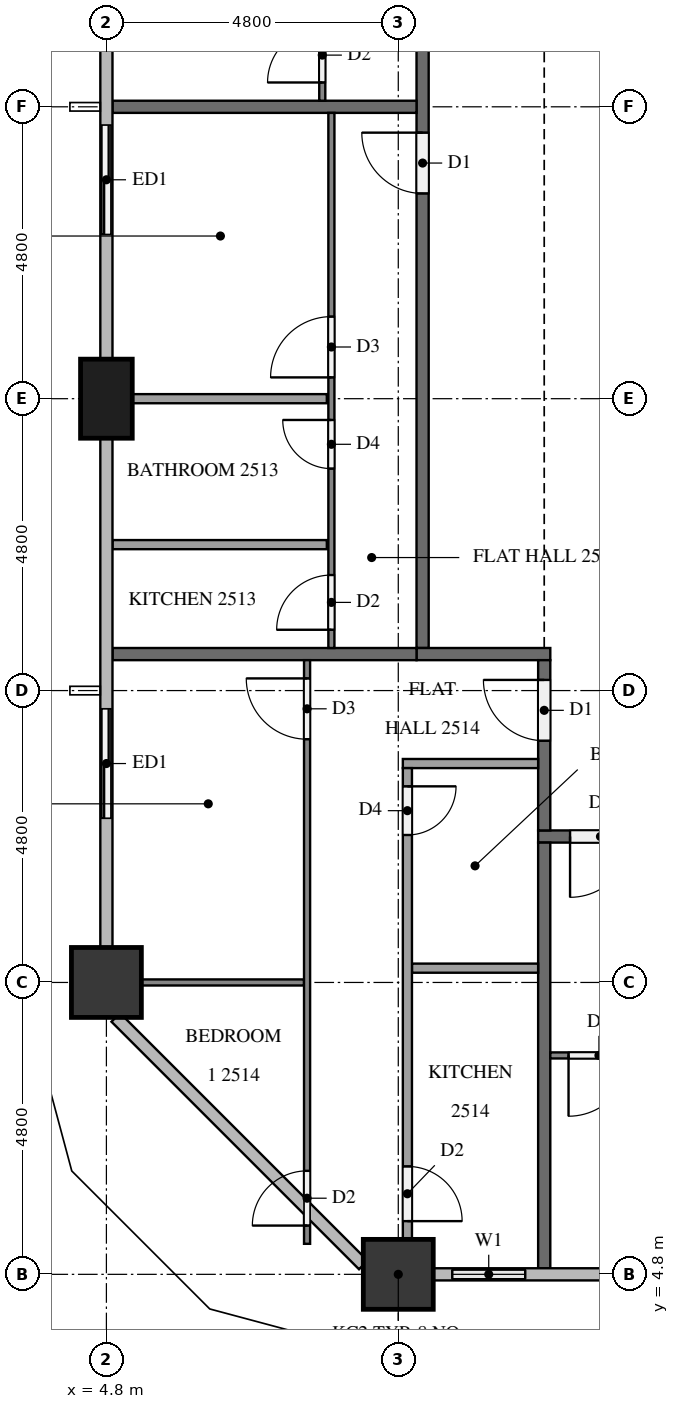
"""IFC4 building model, lengths in metres.
Left out: names, types, materials, properties, quantities, classifications, styles, units other than length and angle.
Written with IfcOpenShell. Run it as: python <this file> out.ifc"""

import sys

from ifc_helpers import new_model, si_unit, direction, frame, frame_2d, origin, origin_2d, place, context, subcontext, project, spatial, rectangle, extrude, element, fill, save


model = new_model("IFC4")
c1 = context("Model", 3, precision=1e-05, world=origin(), true_north=direction((0.0, 1.0)))
c2 = subcontext(c1, "Body", "Model", "MODEL_VIEW")
j1 = project(units=[si_unit("LENGTHUNIT", "METRE"), si_unit("PLANEANGLEUNIT", "RADIAN")], contexts=[c1])
p1 = place(None, origin())
s1 = spatial("IfcSite", under=j1, at=p1, CompositionType="ELEMENT")
p2 = place(p1, origin())
s2 = spatial("IfcBuilding", under=s1, at=p2, CompositionType="ELEMENT")
p3 = place(p2, frame((0.0, 0.0, 99.7)))
s3 = spatial("IfcBuildingStorey", under=s2, at=p3, CompositionType="ELEMENT", Elevation=99.7)
p4 = place(p3, frame((9.6, 4.8, 0.0), z_axis=(0.0, 0.0, 1.0), x_axis=(1.0, 0.0, 0.0)))
e1 = element("IfcColumn", 1, at=p4, inside=s3, PredefinedType="COLUMN", context=c2, shape_type="SweptSolid", body=[
    extrude(rectangle(XDim=1.15, YDim=1.15, at=origin_2d()), origin(), (0.0, 0.0, 1.0), 3.2),
])
p5 = place(p3, frame((4.8, 19.2, 0.0), z_axis=(0.0, 0.0, 1.0), x_axis=(0.0, 1.0, 0.0)))
e2 = element("IfcColumn", 2, at=p5, inside=s3, PredefinedType="COLUMN", context=c2, shape_type="SweptSolid", body=[
    extrude(rectangle(XDim=1.3, YDim=0.85, at=origin_2d()), origin(), (0.0, 0.0, 1.0), 3.2),
])
p6 = place(p3, frame((4.8, 9.6, 0.0), z_axis=(0.0, 0.0, 1.0), x_axis=(1.0, 0.0, 0.0)))
e3 = element("IfcColumn", 3, at=p6, inside=s3, PredefinedType="COLUMN", context=c2, shape_type="SweptSolid", body=[
    extrude(rectangle(XDim=1.15, YDim=1.15, at=origin_2d()), origin(), (0.0, 0.0, 1.0), 3.2),
])
p7 = place(p3, frame((10.175, 4.8, 0.0), z_axis=(0.0, 0.0, 1.0), x_axis=(1.0, 0.0, 0.0)))
e4 = element("IfcWall", 4, at=p7, inside=s3, PredefinedType="SOLIDWALL", context=c2, shape_type="SweptSolid", body=[
    extrude(rectangle(XDim=1.825, YDim=0.15, at=frame_2d((0.913, 0.0))), origin(), (0.0, 0.0, 1.0), 3.2),
])
p8 = place(p7, frame((0.312, 0.0, 0.9)))
e5 = element("IfcOpeningElement", 5, at=p8, cuts=e4, PredefinedType="OPENING", context=c2, shape_type="SweptSolid", body=[
    extrude(rectangle(XDim=1.2, YDim=1.4, at=frame_2d((0.6, 0.7))), frame((0.0, 0.085, 0.0), z_axis=(0.0, -1.0, 0.0), x_axis=(1.0, 0.0, 0.0)), (0.0, 0.0, 1.0), 0.17),
])
p9 = place(p3, frame((4.8, 24.0, 0.0), z_axis=(0.0, 0.0, 1.0), x_axis=(0.0, -1.0, 0.0)))
e6 = element("IfcWall", 6, at=p9, inside=s3, PredefinedType="SOLIDWALL", context=c2, shape_type="SweptSolid", body=[
    extrude(rectangle(XDim=2.4, YDim=0.15, at=frame_2d((1.2, 0.0))), origin(), (0.0, 0.0, 1.0), 3.2),
])
p10 = place(p9, frame((0.3, 0.0, 0.0)))
e7 = element("IfcOpeningElement", 7, at=p10, cuts=e6, PredefinedType="OPENING", context=c2, shape_type="SweptSolid", body=[
    extrude(rectangle(XDim=1.8, YDim=2.4, at=frame_2d((0.9, 1.2))), frame((0.0, 0.085, 0.0), z_axis=(0.0, -1.0, 0.0), x_axis=(1.0, 0.0, 0.0)), (0.0, 0.0, 1.0), 0.17),
])
p11 = place(p3, frame((4.8, 14.4, 0.0), z_axis=(0.0, 0.0, 1.0), x_axis=(0.0, -1.0, 0.0)))
e8 = element("IfcWall", 8, at=p11, inside=s3, PredefinedType="SOLIDWALL", context=c2, shape_type="SweptSolid", body=[
    extrude(rectangle(XDim=2.4, YDim=0.15, at=frame_2d((1.2, 0.0))), origin(), (0.0, 0.0, 1.0), 3.2),
])
p12 = place(p11, frame((0.3, 0.0, 0.0)))
e9 = element("IfcOpeningElement", 9, at=p12, cuts=e8, PredefinedType="OPENING", context=c2, shape_type="SweptSolid", body=[
    extrude(rectangle(XDim=1.8, YDim=2.4, at=frame_2d((0.9, 1.2))), frame((0.0, 0.085, 0.0), z_axis=(0.0, -1.0, 0.0), x_axis=(1.0, 0.0, 0.0)), (0.0, 0.0, 1.0), 0.17),
])
p13 = place(p3, frame((50.5, 12.0, 0.0), z_axis=(0.0, 0.0, 1.0), x_axis=(-1.0, 0.0, 0.0)))
e10 = element("IfcWall", 10, at=p13, inside=s3, PredefinedType="PARTITIONING", context=c2, shape_type="SweptSolid", body=[
    extrude(rectangle(XDim=38.6, YDim=0.2, at=frame_2d((19.3, 0.0))), origin(), (0.0, 0.0, 1.0), 3.2),
])
p14 = place(p13, frame((37.075, 0.0, 0.0)))
e11 = element("IfcOpeningElement", 11, at=p14, cuts=e10, PredefinedType="OPENING", context=c2, shape_type="SweptSolid", body=[
    extrude(rectangle(XDim=1.0, YDim=2.1, at=frame_2d((0.5, 1.05))), frame((0.0, 0.11, 0.0), z_axis=(0.0, -1.0, 0.0), x_axis=(1.0, 0.0, 0.0)), (0.0, 0.0, 1.0), 0.22),
])
p15 = place(p13, frame((22.675, 0.0, 0.0)))
e12 = element("IfcOpeningElement", 12, at=p15, cuts=e10, PredefinedType="OPENING", context=c2, shape_type="SweptSolid", body=[
    extrude(rectangle(XDim=1.0, YDim=2.1, at=frame_2d((0.5, 1.05))), frame((0.0, 0.11, 0.0), z_axis=(0.0, -1.0, 0.0), x_axis=(1.0, 0.0, 0.0)), (0.0, 0.0, 1.0), 0.22),
])
p16 = place(p13, frame((0.525, 0.0, 0.0)))
e13 = element("IfcOpeningElement", 13, at=p16, cuts=e10, PredefinedType="OPENING", context=c2, shape_type="SweptSolid", body=[
    extrude(rectangle(XDim=1.0, YDim=2.1, at=frame_2d((0.5, 1.05))), frame((0.0, 0.11, 0.0), z_axis=(0.0, -1.0, 0.0), x_axis=(1.0, 0.0, 0.0)), (0.0, 0.0, 1.0), 0.22),
])
p17 = place(p3, frame((10.0, 15.1, 0.0), z_axis=(0.0, 0.0, 1.0), x_axis=(0.0, 1.0, 0.0)))
e14 = element("IfcWall", 14, at=p17, inside=s3, PredefinedType="PARTITIONING", context=c2, shape_type="SweptSolid", body=[
    extrude(rectangle(XDim=22.6, YDim=0.2, at=frame_2d((11.3, 0.0))), origin(), (0.0, 0.0, 1.0), 3.2),
])
p18 = place(p17, frame((21.275, 0.0, 0.0)))
e15 = element("IfcOpeningElement", 15, at=p18, cuts=e14, PredefinedType="OPENING", context=c2, shape_type="SweptSolid", body=[
    extrude(rectangle(XDim=1.0, YDim=2.1, at=frame_2d((0.5, 1.05))), frame((0.0, 0.11, 0.0), z_axis=(0.0, -1.0, 0.0), x_axis=(1.0, 0.0, 0.0)), (0.0, 0.0, 1.0), 0.22),
])
p19 = place(p17, frame((7.475, 0.0, 0.0)))
e16 = element("IfcOpeningElement", 16, at=p19, cuts=e14, PredefinedType="OPENING", context=c2, shape_type="SweptSolid", body=[
    extrude(rectangle(XDim=1.0, YDim=2.1, at=frame_2d((0.5, 1.05))), frame((0.0, 0.11, 0.0), z_axis=(0.0, -1.0, 0.0), x_axis=(1.0, 0.0, 0.0)), (0.0, 0.0, 1.0), 0.22),
])
p20 = place(p3, frame((9.9, 15.0, 0.0), z_axis=(0.0, 0.0, 1.0), x_axis=(1.0, 0.0, 0.0)))
e17 = element("IfcWall", 17, at=p20, inside=s3, PredefinedType="PARTITIONING", context=c2, shape_type="SweptSolid", body=[
    extrude(rectangle(XDim=2.2, YDim=0.2, at=frame_2d((1.1, 0.0))), origin(), (0.0, 0.0, 1.0), 3.2),
])
p21 = place(p3, frame((12.0, 12.1, 0.0), z_axis=(0.0, 0.0, 1.0), x_axis=(0.0, 1.0, 0.0)))
e18 = element("IfcWall", 18, at=p21, inside=s3, PredefinedType="PARTITIONING", context=c2, shape_type="SweptSolid", body=[
    extrude(rectangle(XDim=2.8, YDim=0.2, at=frame_2d((1.4, 0.0))), origin(), (0.0, 0.0, 1.0), 3.2),
])
p22 = place(p21, frame((1.475, 0.0, 0.0)))
e19 = element("IfcOpeningElement", 19, at=p22, cuts=e18, PredefinedType="OPENING", context=c2, shape_type="SweptSolid", body=[
    extrude(rectangle(XDim=1.0, YDim=2.1, at=frame_2d((0.5, 1.05))), frame((0.0, 0.11, 0.0), z_axis=(0.0, -1.0, 0.0), x_axis=(1.0, 0.0, 0.0)), (0.0, 0.0, 1.0), 0.22),
])
p23 = place(p3, frame((12.0, 4.9, 0.0), z_axis=(0.0, 0.0, 1.0), x_axis=(0.0, 1.0, 0.0)))
e20 = element("IfcWall", 20, at=p23, inside=s3, PredefinedType="PARTITIONING", context=c2, shape_type="SweptSolid", body=[
    extrude(rectangle(XDim=7.0, YDim=0.2, at=frame_2d((3.5, 0.0))), origin(), (0.0, 0.0, 1.0), 3.2),
])
for number, where, z_axis, x_axis in (
    (21, (4.9, 24.0, 0.0), (0.0, 0.0, 1.0), (1.0, 0.0, 0.0)),
    (22, (4.9, 15.0, 0.0), (0.0, 0.0, 1.0), (1.0, 0.0, 0.0)),
):
    element("IfcWall", number, at=place(p3, frame(where, z_axis=z_axis, x_axis=x_axis)), inside=s3, PredefinedType="PARTITIONING", context=c2, shape_type="SweptSolid", body=[
        extrude(rectangle(XDim=5.0, YDim=0.2, at=frame_2d((2.5, 0.0))), origin(), (0.0, 0.0, 1.0), 3.2),
    ])
p24 = place(p3, frame((26.3, 8.4, 0.0), z_axis=(0.0, 0.0, 1.0), x_axis=(-1.0, 0.0, 0.0)))
e23 = element("IfcWall", 23, at=p24, inside=s3, PredefinedType="PARTITIONING", context=c2, shape_type="SweptSolid", body=[
    extrude(rectangle(XDim=14.2, YDim=0.1, at=frame_2d((7.1, 0.0))), origin(), (0.0, 0.0, 1.0), 3.2),
])
p25 = place(p24, frame((12.9, 0.0, 0.0)))
e24 = element("IfcOpeningElement", 24, at=p25, cuts=e23, PredefinedType="OPENING", context=c2, shape_type="SweptSolid", body=[
    extrude(rectangle(XDim=1.0, YDim=2.1, at=frame_2d((0.5, 1.05))), frame((0.0, 0.06, 0.0), z_axis=(0.0, -1.0, 0.0), x_axis=(1.0, 0.0, 0.0)), (0.0, 0.0, 1.0), 0.12),
])
p26 = place(p24, frame((5.05, 0.0, 0.0)))
e25 = element("IfcOpeningElement", 25, at=p26, cuts=e23, PredefinedType="OPENING", context=c2, shape_type="SweptSolid", body=[
    extrude(rectangle(XDim=0.9, YDim=2.1, at=frame_2d((0.45, 1.05))), frame((0.0, 0.06, 0.0), z_axis=(0.0, -1.0, 0.0), x_axis=(1.0, 0.0, 0.0)), (0.0, 0.0, 1.0), 0.12),
])
p27 = place(p24, frame((3.45, 0.0, 0.0)))
e26 = element("IfcOpeningElement", 26, at=p27, cuts=e23, PredefinedType="OPENING", context=c2, shape_type="SweptSolid", body=[
    extrude(rectangle(XDim=0.9, YDim=2.1, at=frame_2d((0.45, 1.05))), frame((0.0, 0.06, 0.0), z_axis=(0.0, -1.0, 0.0), x_axis=(1.0, 0.0, 0.0)), (0.0, 0.0, 1.0), 0.12),
])
p28 = place(p3, frame((8.35, 24.1, 0.0), z_axis=(0.0, 0.0, 1.0), x_axis=(0.0, 1.0, 0.0)))
e27 = element("IfcWall", 27, at=p28, inside=s3, PredefinedType="PARTITIONING", context=c2, shape_type="SweptSolid", body=[
    extrude(rectangle(XDim=13.6, YDim=0.1, at=frame_2d((6.8, 0.0))), origin(), (0.0, 0.0, 1.0), 3.2),
])
p29 = place(p28, frame((12.3, 0.0, 0.0)))
e28 = element("IfcOpeningElement", 28, at=p29, cuts=e27, PredefinedType="OPENING", context=c2, shape_type="SweptSolid", body=[
    extrude(rectangle(XDim=1.0, YDim=2.1, at=frame_2d((0.5, 1.05))), frame((0.0, 0.06, 0.0), z_axis=(0.0, -1.0, 0.0), x_axis=(1.0, 0.0, 0.0)), (0.0, 0.0, 1.0), 0.12),
])
p30 = place(p28, frame((5.05, 0.0, 0.0)))
e29 = element("IfcOpeningElement", 29, at=p30, cuts=e27, PredefinedType="OPENING", context=c2, shape_type="SweptSolid", body=[
    extrude(rectangle(XDim=0.9, YDim=2.1, at=frame_2d((0.45, 1.05))), frame((0.0, 0.06, 0.0), z_axis=(0.0, -1.0, 0.0), x_axis=(1.0, 0.0, 0.0)), (0.0, 0.0, 1.0), 0.12),
])
p31 = place(p28, frame((3.55, 0.0, 0.0)))
e30 = element("IfcOpeningElement", 30, at=p31, cuts=e27, PredefinedType="OPENING", context=c2, shape_type="SweptSolid", body=[
    extrude(rectangle(XDim=0.8, YDim=2.1, at=frame_2d((0.4, 1.05))), frame((0.0, 0.06, 0.0), z_axis=(0.0, -1.0, 0.0), x_axis=(1.0, 0.0, 0.0)), (0.0, 0.0, 1.0), 0.12),
])
p32 = place(p28, frame((0.3, 0.0, 0.0)))
e31 = element("IfcOpeningElement", 31, at=p32, cuts=e27, PredefinedType="OPENING", context=c2, shape_type="SweptSolid", body=[
    extrude(rectangle(XDim=0.9, YDim=2.1, at=frame_2d((0.45, 1.05))), frame((0.0, 0.06, 0.0), z_axis=(0.0, -1.0, 0.0), x_axis=(1.0, 0.0, 0.0)), (0.0, 0.0, 1.0), 0.12),
])
p33 = place(p3, frame((8.425, 19.2, 0.0), z_axis=(0.0, 0.0, 1.0), x_axis=(-1.0, 0.0, 0.0)))
e32 = element("IfcWall", 32, at=p33, inside=s3, PredefinedType="PARTITIONING", context=c2, shape_type="SweptSolid", body=[
    extrude(rectangle(XDim=3.2, YDim=0.15, at=frame_2d((1.6, 0.0))), origin(), (0.0, 0.0, 1.0), 3.2),
])
p34 = place(p3, frame((8.425, 16.8, 0.0), z_axis=(0.0, 0.0, 1.0), x_axis=(-1.0, 0.0, 0.0)))
e33 = element("IfcWall", 33, at=p34, inside=s3, PredefinedType="PARTITIONING", context=c2, shape_type="SweptSolid", body=[
    extrude(rectangle(XDim=3.525, YDim=0.15, at=frame_2d((1.763, 0.0))), origin(), (0.0, 0.0, 1.0), 3.2),
])
p35 = place(p3, frame((8.5, 15.1, 0.0), z_axis=(0.0, 0.0, 1.0), x_axis=(0.0, 1.0, 0.0)))
e34 = element("IfcWall", 34, at=p35, inside=s3, PredefinedType="PARTITIONING", context=c2, shape_type="SweptSolid", body=[
    extrude(rectangle(XDim=8.8, YDim=0.1, at=frame_2d((4.4, 0.0))), origin(), (0.0, 0.0, 1.0), 3.2),
])
p36 = place(p35, frame((4.45, 0.0, 0.0)))
e35 = element("IfcOpeningElement", 35, at=p36, cuts=e34, PredefinedType="OPENING", context=c2, shape_type="SweptSolid", body=[
    extrude(rectangle(XDim=1.0, YDim=2.1, at=frame_2d((0.5, 1.05))), frame((0.0, 0.06, 0.0), z_axis=(0.0, -1.0, 0.0), x_axis=(1.0, 0.0, 0.0)), (0.0, 0.0, 1.0), 0.12),
])
p37 = place(p35, frame((2.95, 0.0, 0.0)))
e36 = element("IfcOpeningElement", 36, at=p37, cuts=e34, PredefinedType="OPENING", context=c2, shape_type="SweptSolid", body=[
    extrude(rectangle(XDim=0.8, YDim=2.1, at=frame_2d((0.4, 1.05))), frame((0.0, 0.06, 0.0), z_axis=(0.0, -1.0, 0.0), x_axis=(1.0, 0.0, 0.0)), (0.0, 0.0, 1.0), 0.12),
])
p38 = place(p35, frame((0.3, 0.0, 0.0)))
e37 = element("IfcOpeningElement", 37, at=p38, cuts=e34, PredefinedType="OPENING", context=c2, shape_type="SweptSolid", body=[
    extrude(rectangle(XDim=0.9, YDim=2.1, at=frame_2d((0.45, 1.05))), frame((0.0, 0.06, 0.0), z_axis=(0.0, -1.0, 0.0), x_axis=(1.0, 0.0, 0.0)), (0.0, 0.0, 1.0), 0.12),
])
p39 = place(p3, frame((8.05, 9.6, 0.0), z_axis=(0.0, 0.0, 1.0), x_axis=(-1.0, 0.0, 0.0)))
e38 = element("IfcWall", 38, at=p39, inside=s3, PredefinedType="PARTITIONING", context=c2, shape_type="SweptSolid", body=[
    extrude(rectangle(XDim=2.675, YDim=0.1, at=frame_2d((1.337, 0.0))), origin(), (0.0, 0.0, 1.0), 3.2),
])
p40 = place(p3, frame((8.1, 5.302, 0.0), z_axis=(0.0, 0.0, 1.0), x_axis=(0.0, 1.0, 0.0)))
e39 = element("IfcWall", 39, at=p40, inside=s3, PredefinedType="PARTITIONING", context=c2, shape_type="SweptSolid", body=[
    extrude(rectangle(XDim=9.598, YDim=0.1, at=frame_2d((4.799, 0.0))), origin(), (0.0, 0.0, 1.0), 3.2),
])
p41 = place(p40, frame((8.298, 0.0, 0.0)))
e40 = element("IfcOpeningElement", 40, at=p41, cuts=e39, PredefinedType="OPENING", context=c2, shape_type="SweptSolid", body=[
    extrude(rectangle(XDim=1.0, YDim=2.1, at=frame_2d((0.5, 1.05))), frame((0.0, 0.06, 0.0), z_axis=(0.0, -1.0, 0.0), x_axis=(1.0, 0.0, 0.0)), (0.0, 0.0, 1.0), 0.12),
])
p42 = place(p40, frame((0.3, 0.0, 0.0)))
e41 = element("IfcOpeningElement", 41, at=p42, cuts=e39, PredefinedType="OPENING", context=c2, shape_type="SweptSolid", body=[
    extrude(rectangle(XDim=0.9, YDim=2.1, at=frame_2d((0.45, 1.05))), frame((0.0, 0.06, 0.0), z_axis=(0.0, -1.0, 0.0), x_axis=(1.0, 0.0, 0.0)), (0.0, 0.0, 1.0), 0.12),
])
p43 = place(p3, frame((11.9, 9.835, 0.0), z_axis=(0.0, 0.0, 1.0), x_axis=(-1.0, 0.0, 0.0)))
e42 = element("IfcWall", 42, at=p43, inside=s3, PredefinedType="PARTITIONING", context=c2, shape_type="SweptSolid", body=[
    extrude(rectangle(XDim=2.075, YDim=0.15, at=frame_2d((1.038, 0.0))), origin(), (0.0, 0.0, 1.0), 3.2),
])
p44 = place(p3, frame((11.9, 13.2, 0.0), z_axis=(0.0, 0.0, 1.0), x_axis=(-1.0, 0.0, 0.0)))
e43 = element("IfcWall", 43, at=p44, inside=s3, PredefinedType="PARTITIONING", context=c2, shape_type="SweptSolid", body=[
    extrude(rectangle(XDim=2.225, YDim=0.15, at=frame_2d((1.112, 0.0))), origin(), (0.0, 0.0, 1.0), 3.2),
])
p45 = place(p3, frame((9.75, 13.125, 0.0), z_axis=(0.0, 0.0, 1.0), x_axis=(0.0, -1.0, 0.0)))
e44 = element("IfcWall", 44, at=p45, inside=s3, PredefinedType="PARTITIONING", context=c2, shape_type="SweptSolid", body=[
    extrude(rectangle(XDim=7.75, YDim=0.15, at=frame_2d((3.875, 0.0))), origin(), (0.0, 0.0, 1.0), 3.2),
])
p46 = place(p45, frame((0.3, 0.0, 0.0)))
e45 = element("IfcOpeningElement", 45, at=p46, cuts=e44, PredefinedType="OPENING", context=c2, shape_type="SweptSolid", body=[
    extrude(rectangle(XDim=0.8, YDim=2.1, at=frame_2d((0.4, 1.05))), frame((0.0, 0.085, 0.0), z_axis=(0.0, -1.0, 0.0), x_axis=(1.0, 0.0, 0.0)), (0.0, 0.0, 1.0), 0.17),
])
p47 = place(p45, frame((6.55, 0.0, 0.0)))
e46 = element("IfcOpeningElement", 46, at=p47, cuts=e44, PredefinedType="OPENING", context=c2, shape_type="SweptSolid", body=[
    extrude(rectangle(XDim=0.9, YDim=2.1, at=frame_2d((0.45, 1.05))), frame((0.0, 0.085, 0.0), z_axis=(0.0, -1.0, 0.0), x_axis=(1.0, 0.0, 0.0)), (0.0, 0.0, 1.0), 0.17),
])
p48 = place(p8, origin())
e47 = element("IfcWindow", 47, at=p48, inside=s3, PartitioningType="SINGLE_PANEL", PredefinedType="WINDOW", context=c2, shape_type="SweptSolid", body=[
    extrude(rectangle(XDim=1.2, YDim=1.4, at=frame_2d((0.6, 0.7))), frame((0.0, 0.03, 0.0), z_axis=(0.0, -1.0, 0.0), x_axis=(1.0, 0.0, 0.0)), (0.0, 0.0, 1.0), 0.06),
])
fill(e5, e47)
p49 = place(p10, origin())
e48 = element("IfcDoor", 48, at=p49, inside=s3, OperationType="SLIDING_TO_LEFT", PredefinedType="DOOR", context=c2, shape_type="SweptSolid", body=[
    extrude(rectangle(XDim=1.8, YDim=2.4, at=frame_2d((0.9, 1.2))), frame((0.0, 0.025, 0.0), z_axis=(0.0, -1.0, 0.0), x_axis=(1.0, 0.0, 0.0)), (0.0, 0.0, 1.0), 0.05),
])
fill(e7, e48)
p50 = place(p12, origin())
e49 = element("IfcDoor", 49, at=p50, inside=s3, OperationType="SLIDING_TO_RIGHT", PredefinedType="DOOR", context=c2, shape_type="SweptSolid", body=[
    extrude(rectangle(XDim=1.8, YDim=2.4, at=frame_2d((0.9, 1.2))), frame((0.0, 0.025, 0.0), z_axis=(0.0, -1.0, 0.0), x_axis=(1.0, 0.0, 0.0)), (0.0, 0.0, 1.0), 0.05),
])
fill(e9, e49)
p51 = place(p14, origin())
e50 = element("IfcDoor", 50, at=p51, inside=s3, OperationType="SINGLE_SWING_RIGHT", PredefinedType="DOOR", context=c2, shape_type="SweptSolid", body=[
    extrude(rectangle(XDim=1.0, YDim=2.1, at=frame_2d((0.5, 1.05))), frame((0.0, 0.025, 0.0), z_axis=(0.0, -1.0, 0.0), x_axis=(1.0, 0.0, 0.0)), (0.0, 0.0, 1.0), 0.05),
])
fill(e11, e50)
p52 = place(p19, origin())
e51 = element("IfcDoor", 51, at=p52, inside=s3, OperationType="SINGLE_SWING_RIGHT", PredefinedType="DOOR", context=c2, shape_type="SweptSolid", body=[
    extrude(rectangle(XDim=1.0, YDim=2.1, at=frame_2d((0.5, 1.05))), frame((0.0, 0.025, 0.0), z_axis=(0.0, -1.0, 0.0), x_axis=(1.0, 0.0, 0.0)), (0.0, 0.0, 1.0), 0.05),
])
fill(e16, e51)
p53 = place(p22, origin())
e52 = element("IfcDoor", 52, at=p53, inside=s3, OperationType="SINGLE_SWING_RIGHT", PredefinedType="DOOR", context=c2, shape_type="SweptSolid", body=[
    extrude(rectangle(XDim=1.0, YDim=2.1, at=frame_2d((0.5, 1.05))), frame((0.0, 0.025, 0.0), z_axis=(0.0, -1.0, 0.0), x_axis=(1.0, 0.0, 0.0)), (0.0, 0.0, 1.0), 0.05),
])
fill(e19, e52)
p54 = place(p25, origin())
e53 = element("IfcDoor", 53, at=p54, inside=s3, OperationType="SINGLE_SWING_RIGHT", PredefinedType="DOOR", context=c2, shape_type="SweptSolid", body=[
    extrude(rectangle(XDim=1.0, YDim=2.1, at=frame_2d((0.5, 1.05))), frame((0.0, 0.025, 0.0), z_axis=(0.0, -1.0, 0.0), x_axis=(1.0, 0.0, 0.0)), (0.0, 0.0, 1.0), 0.05),
])
fill(e24, e53)
p55 = place(p32, origin())
e54 = element("IfcDoor", 54, at=p55, inside=s3, OperationType="SINGLE_SWING_LEFT", PredefinedType="DOOR", context=c2, shape_type="SweptSolid", body=[
    extrude(rectangle(XDim=0.9, YDim=2.1, at=frame_2d((0.45, 1.05))), frame((0.0, 0.025, 0.0), z_axis=(0.0, -1.0, 0.0), x_axis=(1.0, 0.0, 0.0)), (0.0, 0.0, 1.0), 0.05),
])
fill(e31, e54)
p56 = place(p36, origin())
e55 = element("IfcDoor", 55, at=p56, inside=s3, OperationType="SINGLE_SWING_LEFT", PredefinedType="DOOR", context=c2, shape_type="SweptSolid", body=[
    extrude(rectangle(XDim=1.0, YDim=2.1, at=frame_2d((0.5, 1.05))), frame((0.0, 0.025, 0.0), z_axis=(0.0, -1.0, 0.0), x_axis=(1.0, 0.0, 0.0)), (0.0, 0.0, 1.0), 0.05),
])
fill(e35, e55)
p57 = place(p37, origin())
e56 = element("IfcDoor", 56, at=p57, inside=s3, OperationType="SINGLE_SWING_RIGHT", PredefinedType="DOOR", context=c2, shape_type="SweptSolid", body=[
    extrude(rectangle(XDim=0.8, YDim=2.1, at=frame_2d((0.4, 1.05))), frame((0.0, 0.025, 0.0), z_axis=(0.0, -1.0, 0.0), x_axis=(1.0, 0.0, 0.0)), (0.0, 0.0, 1.0), 0.05),
])
fill(e36, e56)
p58 = place(p38, origin())
e57 = element("IfcDoor", 57, at=p58, inside=s3, OperationType="SINGLE_SWING_LEFT", PredefinedType="DOOR", context=c2, shape_type="SweptSolid", body=[
    extrude(rectangle(XDim=0.9, YDim=2.1, at=frame_2d((0.45, 1.05))), frame((0.0, 0.025, 0.0), z_axis=(0.0, -1.0, 0.0), x_axis=(1.0, 0.0, 0.0)), (0.0, 0.0, 1.0), 0.05),
])
fill(e37, e57)
p59 = place(p41, origin())
e58 = element("IfcDoor", 58, at=p59, inside=s3, OperationType="SINGLE_SWING_RIGHT", PredefinedType="DOOR", context=c2, shape_type="SweptSolid", body=[
    extrude(rectangle(XDim=1.0, YDim=2.1, at=frame_2d((0.5, 1.05))), frame((0.0, 0.025, 0.0), z_axis=(0.0, -1.0, 0.0), x_axis=(1.0, 0.0, 0.0)), (0.0, 0.0, 1.0), 0.05),
])
fill(e40, e58)
p60 = place(p42, origin())
e59 = element("IfcDoor", 59, at=p60, inside=s3, OperationType="SINGLE_SWING_LEFT", PredefinedType="DOOR", context=c2, shape_type="SweptSolid", body=[
    extrude(rectangle(XDim=0.9, YDim=2.1, at=frame_2d((0.45, 1.05))), frame((0.0, 0.025, 0.0), z_axis=(0.0, -1.0, 0.0), x_axis=(1.0, 0.0, 0.0)), (0.0, 0.0, 1.0), 0.05),
])
fill(e41, e59)
p61 = place(p46, origin())
e60 = element("IfcDoor", 60, at=p61, inside=s3, OperationType="SINGLE_SWING_LEFT", PredefinedType="DOOR", context=c2, shape_type="SweptSolid", body=[
    extrude(rectangle(XDim=0.8, YDim=2.1, at=frame_2d((0.4, 1.05))), frame((0.0, 0.025, 0.0), z_axis=(0.0, -1.0, 0.0), x_axis=(1.0, 0.0, 0.0)), (0.0, 0.0, 1.0), 0.05),
])
fill(e45, e60)
p62 = place(p47, origin())
e61 = element("IfcDoor", 61, at=p62, inside=s3, OperationType="SINGLE_SWING_RIGHT", PredefinedType="DOOR", context=c2, shape_type="SweptSolid", body=[
    extrude(rectangle(XDim=0.9, YDim=2.1, at=frame_2d((0.45, 1.05))), frame((0.0, 0.025, 0.0), z_axis=(0.0, -1.0, 0.0), x_axis=(1.0, 0.0, 0.0)), (0.0, 0.0, 1.0), 0.05),
])
fill(e46, e61)
save(model, sys.argv[1])
